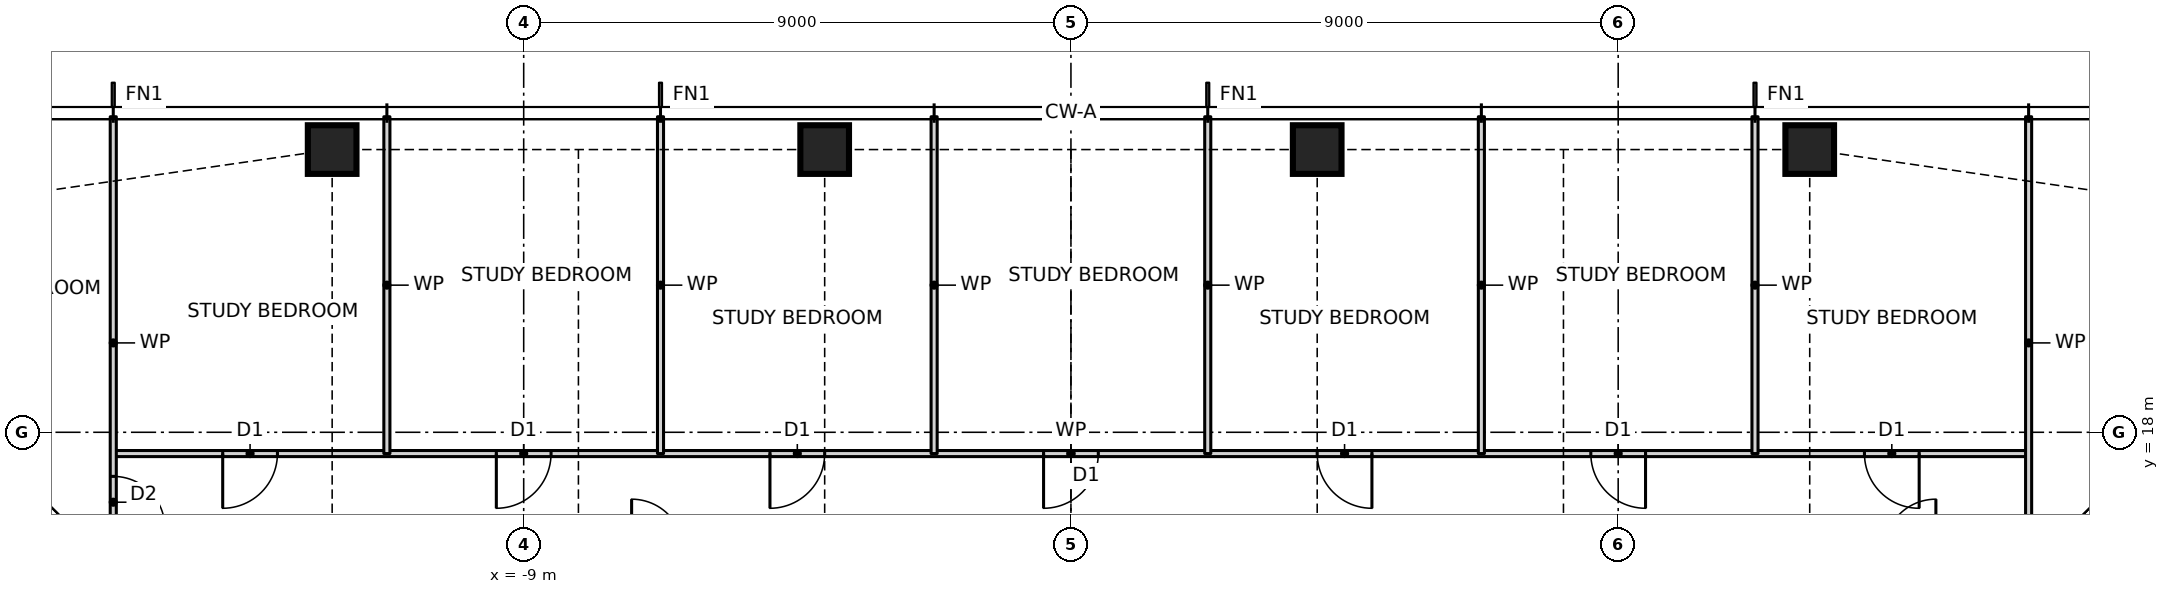
"""IFC4 building model, lengths in metres.
Left out: names, types, materials, properties, quantities, classifications, styles, units other than length and angle.
Written with IfcOpenShell. Run it as: python <this file> out.ifc"""

import sys

from ifc_helpers import new_model, si_unit, direction, frame, frame_2d, origin, origin_2d, place, context, subcontext, project, spatial, rectangle, hollow_rectangle, extrude, element, fill, save


model = new_model("IFC4")
c1 = context("Model", 3, precision=1e-05, world=origin(), true_north=direction((0.0, 1.0)))
c2 = subcontext(c1, "Body", "Model", "MODEL_VIEW")
j1 = project(units=[si_unit("LENGTHUNIT", "METRE"), si_unit("PLANEANGLEUNIT", "RADIAN")], contexts=[c1])
p1 = place(None, origin())
s1 = spatial("IfcSite", under=j1, at=p1, CompositionType="ELEMENT")
p2 = place(p1, origin())
s2 = spatial("IfcBuilding", under=s1, at=p2, CompositionType="ELEMENT")
p3 = place(p2, frame((0.0, 0.0, 39.5)))
s3 = spatial("IfcBuildingStorey", under=s2, at=p3, CompositionType="ELEMENT", Elevation=39.5)
for number, where, z_axis, x_axis in (
    (1, (12.15, 22.65, 0.0), (0.0, 0.0, 1.0), (1.0, 0.0, 0.0)),
    (2, (4.05, 22.65, 0.0), (0.0, 0.0, 1.0), (1.0, 0.0, 0.0)),
    (3, (-4.05, 22.65, 0.0), (0.0, 0.0, 1.0), (1.0, 0.0, 0.0)),
    (4, (-12.15, 22.65, 0.0), (0.0, 0.0, 1.0), (1.0, 0.0, 0.0)),
):
    element("IfcColumn", number, at=place(p3, frame(where, z_axis=z_axis, x_axis=x_axis)), inside=s3, PredefinedType="COLUMN", context=c2, shape_type="SweptSolid", body=[
        extrude(hollow_rectangle(XDim=0.8, YDim=0.8, WallThickness=0.09, at=origin_2d()), origin(), (0.0, 0.0, 1.0), 3.5),
    ])
p4 = place(p3, frame((-15.75, 17.65, 0.0), z_axis=(0.0, 0.0, 1.0), x_axis=(1.0, 0.0, 0.0)))
e5 = element("IfcWall", 5, at=p4, inside=s3, PredefinedType="PARTITIONING", context=c2, shape_type="SweptSolid", body=[
    extrude(rectangle(XDim=31.5, YDim=0.1, at=frame_2d((15.75, 0.0))), origin(), (0.0, 0.0, 1.0), 3.27),
])
p5 = place(p4, frame((28.8, 0.0, 0.0)))
e6 = element("IfcOpeningElement", 6, at=p5, cuts=e5, PredefinedType="OPENING", context=c2, shape_type="SweptSolid", body=[
    extrude(rectangle(XDim=0.9, YDim=2.1, at=frame_2d((0.45, 1.05))), frame((0.0, 0.06, 0.0), z_axis=(0.0, -1.0, 0.0), x_axis=(1.0, 0.0, 0.0)), (0.0, 0.0, 1.0), 0.12),
])
p6 = place(p4, frame((24.3, 0.0, 0.0)))
e7 = element("IfcOpeningElement", 7, at=p6, cuts=e5, PredefinedType="OPENING", context=c2, shape_type="SweptSolid", body=[
    extrude(rectangle(XDim=0.9, YDim=2.1, at=frame_2d((0.45, 1.05))), frame((0.0, 0.06, 0.0), z_axis=(0.0, -1.0, 0.0), x_axis=(1.0, 0.0, 0.0)), (0.0, 0.0, 1.0), 0.12),
])
p7 = place(p4, frame((19.8, 0.0, 0.0)))
e8 = element("IfcOpeningElement", 8, at=p7, cuts=e5, PredefinedType="OPENING", context=c2, shape_type="SweptSolid", body=[
    extrude(rectangle(XDim=0.9, YDim=2.1, at=frame_2d((0.45, 1.05))), frame((0.0, 0.06, 0.0), z_axis=(0.0, -1.0, 0.0), x_axis=(1.0, 0.0, 0.0)), (0.0, 0.0, 1.0), 0.12),
])
p8 = place(p4, frame((15.3, 0.0, 0.0)))
e9 = element("IfcOpeningElement", 9, at=p8, cuts=e5, PredefinedType="OPENING", context=c2, shape_type="SweptSolid", body=[
    extrude(rectangle(XDim=0.9, YDim=2.1, at=frame_2d((0.45, 1.05))), frame((0.0, 0.06, 0.0), z_axis=(0.0, -1.0, 0.0), x_axis=(1.0, 0.0, 0.0)), (0.0, 0.0, 1.0), 0.12),
])
p9 = place(p4, frame((10.8, 0.0, 0.0)))
e10 = element("IfcOpeningElement", 10, at=p9, cuts=e5, PredefinedType="OPENING", context=c2, shape_type="SweptSolid", body=[
    extrude(rectangle(XDim=0.9, YDim=2.1, at=frame_2d((0.45, 1.05))), frame((0.0, 0.06, 0.0), z_axis=(0.0, -1.0, 0.0), x_axis=(1.0, 0.0, 0.0)), (0.0, 0.0, 1.0), 0.12),
])
p10 = place(p4, frame((6.3, 0.0, 0.0)))
e11 = element("IfcOpeningElement", 11, at=p10, cuts=e5, PredefinedType="OPENING", context=c2, shape_type="SweptSolid", body=[
    extrude(rectangle(XDim=0.9, YDim=2.1, at=frame_2d((0.45, 1.05))), frame((0.0, 0.06, 0.0), z_axis=(0.0, -1.0, 0.0), x_axis=(1.0, 0.0, 0.0)), (0.0, 0.0, 1.0), 0.12),
])
p11 = place(p4, frame((1.8, 0.0, 0.0)))
e12 = element("IfcOpeningElement", 12, at=p11, cuts=e5, PredefinedType="OPENING", context=c2, shape_type="SweptSolid", body=[
    extrude(rectangle(XDim=0.9, YDim=2.1, at=frame_2d((0.45, 1.05))), frame((0.0, 0.06, 0.0), z_axis=(0.0, -1.0, 0.0), x_axis=(1.0, 0.0, 0.0)), (0.0, 0.0, 1.0), 0.12),
])
p12 = place(p3, frame((15.75, 15.75, 0.0), z_axis=(0.0, 0.0, 1.0), x_axis=(0.0, 1.0, 0.0)))
e13 = element("IfcWall", 13, at=p12, inside=s3, PredefinedType="PARTITIONING", context=c2, shape_type="SweptSolid", body=[
    extrude(rectangle(XDim=7.44, YDim=0.1, at=frame_2d((3.72, 0.0))), origin(), (0.0, 0.0, 1.0), 3.27),
])
for number, where, z_axis, x_axis in (
    (14, (11.25, 17.65, 0.0), (0.0, 0.0, 1.0), (0.0, 1.0, 0.0)),
    (15, (6.75, 17.65, 0.0), (0.0, 0.0, 1.0), (0.0, 1.0, 0.0)),
    (16, (2.25, 17.65, 0.0), (0.0, 0.0, 1.0), (0.0, 1.0, 0.0)),
    (17, (-2.25, 17.65, 0.0), (0.0, 0.0, 1.0), (0.0, 1.0, 0.0)),
    (18, (-6.75, 17.65, 0.0), (0.0, 0.0, 1.0), (0.0, 1.0, 0.0)),
    (19, (-11.25, 17.65, 0.0), (0.0, 0.0, 1.0), (0.0, 1.0, 0.0)),
):
    element("IfcWall", number, at=place(p3, frame(where, z_axis=z_axis, x_axis=x_axis)), inside=s3, PredefinedType="PARTITIONING", context=c2, shape_type="SweptSolid", body=[
        extrude(rectangle(XDim=5.54, YDim=0.1, at=frame_2d((2.77, 0.0))), origin(), (0.0, 0.0, 1.0), 3.27),
    ])
p13 = place(p3, frame((-15.75, 15.75, 0.0), z_axis=(0.0, 0.0, 1.0), x_axis=(0.0, 1.0, 0.0)))
e20 = element("IfcWall", 20, at=p13, inside=s3, PredefinedType="PARTITIONING", context=c2, shape_type="SweptSolid", body=[
    extrude(rectangle(XDim=7.44, YDim=0.1, at=frame_2d((3.72, 0.0))), origin(), (0.0, 0.0, 1.0), 3.27),
])
p14 = place(p13, frame((0.675, 0.0, 0.0)))
e21 = element("IfcOpeningElement", 21, at=p14, cuts=e20, PredefinedType="OPENING", context=c2, shape_type="SweptSolid", body=[
    extrude(rectangle(XDim=0.85, YDim=2.1, at=frame_2d((0.425, 1.05))), frame((0.0, 0.06, 0.0), z_axis=(0.0, -1.0, 0.0), x_axis=(1.0, 0.0, 0.0)), (0.0, 0.0, 1.0), 0.12),
])
p15 = place(p5, frame((0.9, 0.0, 0.0), z_axis=(0.0, 0.0, 1.0), x_axis=(-1.0, 0.0, 0.0)))
e22 = element("IfcDoor", 22, at=p15, inside=s3, OperationType="SINGLE_SWING_LEFT", PredefinedType="DOOR", context=c2, shape_type="SweptSolid", body=[
    extrude(rectangle(XDim=0.9, YDim=2.1, at=frame_2d((0.45, 1.05))), frame((0.0, 0.025, 0.0), z_axis=(0.0, -1.0, 0.0), x_axis=(1.0, 0.0, 0.0)), (0.0, 0.0, 1.0), 0.05),
])
fill(e6, e22)
p16 = place(p6, frame((0.9, 0.0, 0.0), z_axis=(0.0, 0.0, 1.0), x_axis=(-1.0, 0.0, 0.0)))
e23 = element("IfcDoor", 23, at=p16, inside=s3, OperationType="SINGLE_SWING_LEFT", PredefinedType="DOOR", context=c2, shape_type="SweptSolid", body=[
    extrude(rectangle(XDim=0.9, YDim=2.1, at=frame_2d((0.45, 1.05))), frame((0.0, 0.025, 0.0), z_axis=(0.0, -1.0, 0.0), x_axis=(1.0, 0.0, 0.0)), (0.0, 0.0, 1.0), 0.05),
])
fill(e7, e23)
p17 = place(p7, frame((0.9, 0.0, 0.0), z_axis=(0.0, 0.0, 1.0), x_axis=(-1.0, 0.0, 0.0)))
e24 = element("IfcDoor", 24, at=p17, inside=s3, OperationType="SINGLE_SWING_LEFT", PredefinedType="DOOR", context=c2, shape_type="SweptSolid", body=[
    extrude(rectangle(XDim=0.9, YDim=2.1, at=frame_2d((0.45, 1.05))), frame((0.0, 0.025, 0.0), z_axis=(0.0, -1.0, 0.0), x_axis=(1.0, 0.0, 0.0)), (0.0, 0.0, 1.0), 0.05),
])
fill(e8, e24)
p18 = place(p8, frame((0.9, 0.0, 0.0), z_axis=(0.0, 0.0, 1.0), x_axis=(-1.0, 0.0, 0.0)))
e25 = element("IfcDoor", 25, at=p18, inside=s3, OperationType="SINGLE_SWING_RIGHT", PredefinedType="DOOR", context=c2, shape_type="SweptSolid", body=[
    extrude(rectangle(XDim=0.9, YDim=2.1, at=frame_2d((0.45, 1.05))), frame((0.0, 0.025, 0.0), z_axis=(0.0, -1.0, 0.0), x_axis=(1.0, 0.0, 0.0)), (0.0, 0.0, 1.0), 0.05),
])
fill(e9, e25)
p19 = place(p9, frame((0.9, 0.0, 0.0), z_axis=(0.0, 0.0, 1.0), x_axis=(-1.0, 0.0, 0.0)))
e26 = element("IfcDoor", 26, at=p19, inside=s3, OperationType="SINGLE_SWING_RIGHT", PredefinedType="DOOR", context=c2, shape_type="SweptSolid", body=[
    extrude(rectangle(XDim=0.9, YDim=2.1, at=frame_2d((0.45, 1.05))), frame((0.0, 0.025, 0.0), z_axis=(0.0, -1.0, 0.0), x_axis=(1.0, 0.0, 0.0)), (0.0, 0.0, 1.0), 0.05),
])
fill(e10, e26)
p20 = place(p10, frame((0.9, 0.0, 0.0), z_axis=(0.0, 0.0, 1.0), x_axis=(-1.0, 0.0, 0.0)))
e27 = element("IfcDoor", 27, at=p20, inside=s3, OperationType="SINGLE_SWING_RIGHT", PredefinedType="DOOR", context=c2, shape_type="SweptSolid", body=[
    extrude(rectangle(XDim=0.9, YDim=2.1, at=frame_2d((0.45, 1.05))), frame((0.0, 0.025, 0.0), z_axis=(0.0, -1.0, 0.0), x_axis=(1.0, 0.0, 0.0)), (0.0, 0.0, 1.0), 0.05),
])
fill(e11, e27)
p21 = place(p11, frame((0.9, 0.0, 0.0), z_axis=(0.0, 0.0, 1.0), x_axis=(-1.0, 0.0, 0.0)))
e28 = element("IfcDoor", 28, at=p21, inside=s3, OperationType="SINGLE_SWING_RIGHT", PredefinedType="DOOR", context=c2, shape_type="SweptSolid", body=[
    extrude(rectangle(XDim=0.9, YDim=2.1, at=frame_2d((0.45, 1.05))), frame((0.0, 0.025, 0.0), z_axis=(0.0, -1.0, 0.0), x_axis=(1.0, 0.0, 0.0)), (0.0, 0.0, 1.0), 0.05),
])
fill(e12, e28)
p22 = place(p14, frame((0.85, 0.0, 0.0), z_axis=(0.0, 0.0, 1.0), x_axis=(-1.0, 0.0, 0.0)))
e29 = element("IfcDoor", 29, at=p22, inside=s3, OperationType="SINGLE_SWING_RIGHT", PredefinedType="DOOR", context=c2, shape_type="SweptSolid", body=[
    extrude(rectangle(XDim=0.85, YDim=2.1, at=frame_2d((0.425, 1.05))), frame((0.0, 0.025, 0.0), z_axis=(0.0, -1.0, 0.0), x_axis=(1.0, 0.0, 0.0)), (0.0, 0.0, 1.0), 0.05),
])
fill(e21, e29)
save(model, sys.argv[1])
